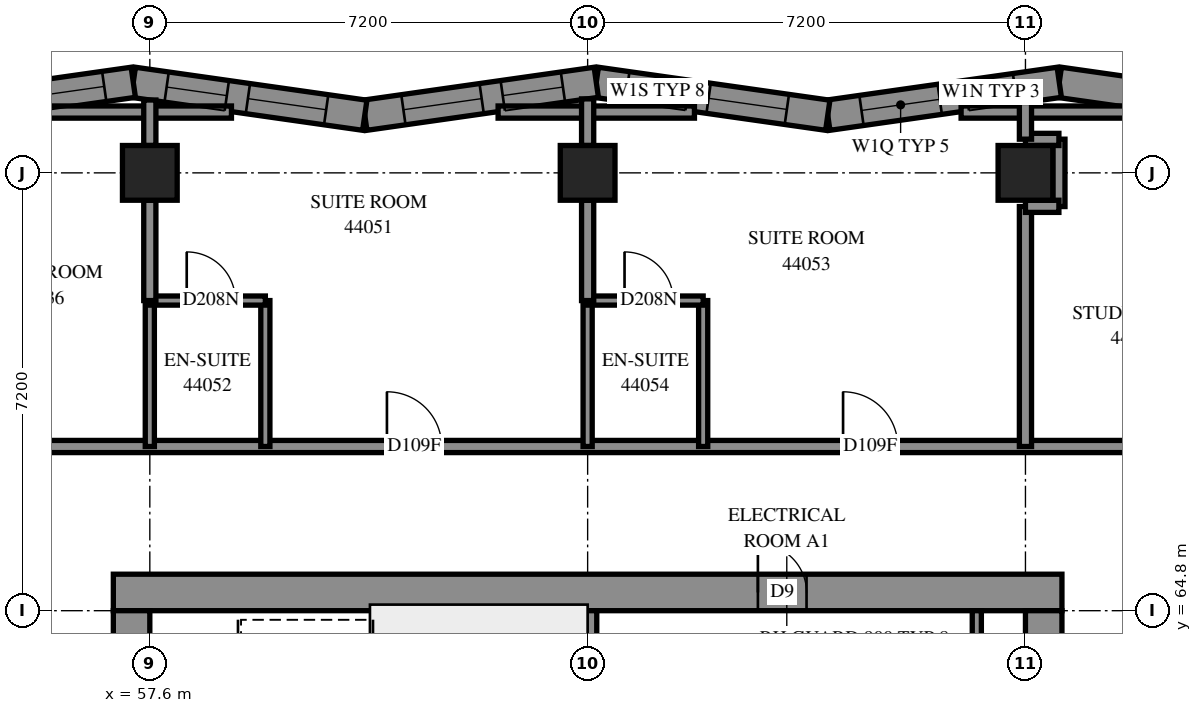
"""IFC4 building model, lengths in metres.
Left out: names, types, materials, properties, quantities, classifications, styles, units other than length and angle.
Written with IfcOpenShell. Run it as: python <this file> out.ifc"""

import sys

from ifc_helpers import new_model, si_unit, direction, frame, frame_2d, origin, origin_2d, place, context, subcontext, project, spatial, polyline, rectangle, outline, extrude, element, fill, save


model = new_model("IFC4")
c1 = context("Model", 3, precision=1e-05, world=origin(), true_north=direction((0.0, 1.0)))
c2 = subcontext(c1, "Body", "Model", "MODEL_VIEW")
j1 = project(units=[si_unit("LENGTHUNIT", "METRE"), si_unit("PLANEANGLEUNIT", "RADIAN")], contexts=[c1])
p1 = place(None, origin())
s1 = spatial("IfcSite", under=j1, at=p1, CompositionType="ELEMENT")
p2 = place(p1, origin())
s2 = spatial("IfcBuilding", under=s1, at=p2, CompositionType="ELEMENT")
p3 = place(p2, frame((0.0, 0.0, 162.6)))
s3 = spatial("IfcBuildingStorey", under=s2, at=p3, CompositionType="ELEMENT", Elevation=162.6)
for number, where, z_axis, x_axis in (
    (1, (57.6, 72.0, 0.0), (0.0, 0.0, 1.0), (1.0, 0.0, 0.0)),
    (2, (64.8, 72.0, 0.0), (0.0, 0.0, 1.0), (1.0, 0.0, 0.0)),
    (3, (72.0, 72.0, 0.0), (0.0, 0.0, 1.0), (1.0, 0.0, 0.0)),
):
    element("IfcColumn", number, at=place(p3, frame(where, z_axis=z_axis, x_axis=x_axis)), inside=s3, PredefinedType="COLUMN", context=c2, shape_type="SweptSolid", body=[
        extrude(rectangle(XDim=0.9, YDim=0.9, at=origin_2d()), origin(), (0.0, 0.0, 1.0), 3.1),
    ])
p4 = place(p3, frame((57.0, 65.1, -0.3), z_axis=(0.0, 0.0, 1.0), x_axis=(1.0, 0.0, 0.0)))
e4 = element("IfcWall", 4, at=p4, inside=s3, PredefinedType="SHEAR", context=c2, shape_type="SweptSolid", body=[
    extrude(rectangle(XDim=15.6, YDim=0.6, at=frame_2d((7.8, 0.0))), origin(), (0.0, 0.0, 1.0), 2.7),
])
p5 = place(p4, frame((10.6, 0.0, 0.3)))
e5 = element("IfcOpeningElement", 5, at=p5, cuts=e4, PredefinedType="OPENING", context=c2, shape_type="SweptSolid", body=[
    extrude(rectangle(XDim=0.8, YDim=2.1, at=frame_2d((0.4, 1.05))), frame((0.0, 0.31, 0.0), z_axis=(0.0, -1.0, 0.0), x_axis=(1.0, 0.0, 0.0)), (0.0, 0.0, 1.0), 0.62),
])
p6 = place(p3, frame((57.3, 50.4, -0.3), z_axis=(0.0, 0.0, 1.0), x_axis=(0.0, 1.0, 0.0)))
e6 = element("IfcWall", 6, at=p6, inside=s3, PredefinedType="SHEAR", context=c2, shape_type="SweptSolid", body=[
    extrude(rectangle(XDim=14.4, YDim=0.6, at=frame_2d((7.2, 0.0))), origin(), (0.0, 0.0, 1.0), 2.7),
])
p7 = place(p6, frame((4.55, 0.0, 0.3)))
e7 = element("IfcOpeningElement", 7, at=p7, cuts=e6, PredefinedType="OPENING", context=c2, shape_type="SweptSolid", body=[
    extrude(rectangle(XDim=1.1, YDim=2.1, at=frame_2d((0.55, 1.05))), frame((0.0, 0.31, 0.0), z_axis=(0.0, -1.0, 0.0), x_axis=(1.0, 0.0, 0.0)), (0.0, 0.0, 1.0), 0.62),
])
p8 = place(p6, frame((11.35, 0.0, 0.3)))
e8 = element("IfcOpeningElement", 8, at=p8, cuts=e6, PredefinedType="OPENING", context=c2, shape_type="SweptSolid", body=[
    extrude(rectangle(XDim=1.1, YDim=2.1, at=frame_2d((0.55, 1.05))), frame((0.0, 0.31, 0.0), z_axis=(0.0, -1.0, 0.0), x_axis=(1.0, 0.0, 0.0)), (0.0, 0.0, 1.0), 0.62),
])
p9 = place(p3, frame((72.3, 50.4, -0.3), z_axis=(0.0, 0.0, 1.0), x_axis=(0.0, 1.0, 0.0)))
e9 = element("IfcWall", 9, at=p9, inside=s3, PredefinedType="SHEAR", context=c2, shape_type="SweptSolid", body=[
    extrude(rectangle(XDim=14.4, YDim=0.6, at=frame_2d((7.2, 0.0))), origin(), (0.0, 0.0, 1.0), 2.7),
])
p10 = place(p9, frame((4.55, 0.0, 0.3)))
e10 = element("IfcOpeningElement", 10, at=p10, cuts=e9, PredefinedType="OPENING", context=c2, shape_type="SweptSolid", body=[
    extrude(rectangle(XDim=1.1, YDim=2.1, at=frame_2d((0.55, 1.05))), frame((0.0, 0.31, 0.0), z_axis=(0.0, -1.0, 0.0), x_axis=(1.0, 0.0, 0.0)), (0.0, 0.0, 1.0), 0.62),
])
p11 = place(p9, frame((11.35, 0.0, 0.3)))
e11 = element("IfcOpeningElement", 11, at=p11, cuts=e9, PredefinedType="OPENING", context=c2, shape_type="SweptSolid", body=[
    extrude(rectangle(XDim=1.1, YDim=2.1, at=frame_2d((0.55, 1.05))), frame((0.0, 0.31, 0.0), z_axis=(0.0, -1.0, 0.0), x_axis=(1.0, 0.0, 0.0)), (0.0, 0.0, 1.0), 0.62),
])
p12 = place(p3, frame((64.8, 60.6, 0.0), z_axis=(0.0, 0.0, 1.0), x_axis=(0.0, 1.0, 0.0)))
e12 = element("IfcWall", 12, at=p12, inside=s3, PredefinedType="SOLIDWALL", context=c2, shape_type="SweptSolid", body=[
    extrude(rectangle(XDim=4.2, YDim=0.3, at=frame_2d((2.1, 0.0))), origin(), (0.0, 0.0, 1.0), 3.1),
])
p13 = place(p3, frame((76.382, 72.945, 0.0), z_axis=(0.0, 0.0, 1.0), x_axis=(-0.9900145925, 0.140964913, 0.0)))
e13 = element("IfcWall", 13, at=p13, inside=s3, PredefinedType="SOLIDWALL", context=c2, shape_type="SweptSolid", body=[
    extrude(outline(polyline([(0.055, -0.25), (3.9, -0.25), (3.829, 0.25), (-0.055, 0.25), (0.055, -0.25)])), origin(), (0.0, 0.0, 1.0), 3.1),
])
p14 = place(p13, frame((0.86, 0.0, 0.45)))
e14 = element("IfcOpeningElement", 14, at=p14, cuts=e13, PredefinedType="OPENING", context=c2, shape_type="SweptSolid", body=[
    extrude(rectangle(XDim=1.2, YDim=2.5, at=frame_2d((0.6, 1.25))), frame((0.0, 0.26, 0.0), z_axis=(0.0, -1.0, 0.0), x_axis=(1.0, 0.0, 0.0)), (0.0, 0.0, 1.0), 0.52),
])
p15 = place(p3, frame((72.556, 73.49, 0.0), z_axis=(0.0, 0.0, 1.0), x_axis=(-0.990016994, -0.1409480459, 0.0)))
e15 = element("IfcWall", 15, at=p15, inside=s3, PredefinedType="SOLIDWALL", context=c2, shape_type="SweptSolid", body=[
    extrude(outline(polyline([(-0.036, -0.25), (3.81, -0.25), (3.881, 0.25), (0.036, 0.25), (-0.036, -0.25)])), origin(), (0.0, 0.0, 1.0), 3.1),
])
p16 = place(p15, frame((0.735, 0.0, 0.45)))
e16 = element("IfcOpeningElement", 16, at=p16, cuts=e15, PredefinedType="OPENING", context=c2, shape_type="SweptSolid", body=[
    extrude(rectangle(XDim=0.8, YDim=2.5, at=frame_2d((0.4, 1.25))), frame((0.0, 0.26, 0.0), z_axis=(0.0, -1.0, 0.0), x_axis=(1.0, 0.0, 0.0)), (0.0, 0.0, 1.0), 0.52),
])
p17 = place(p15, frame((1.985, 0.0, 0.45)))
e17 = element("IfcOpeningElement", 17, at=p17, cuts=e15, PredefinedType="OPENING", context=c2, shape_type="SweptSolid", body=[
    extrude(rectangle(XDim=1.3, YDim=2.5, at=frame_2d((0.65, 1.25))), frame((0.0, 0.26, 0.0), z_axis=(0.0, -1.0, 0.0), x_axis=(1.0, 0.0, 0.0)), (0.0, 0.0, 1.0), 0.52),
])
p18 = place(p3, frame((68.749, 72.948, 0.0), z_axis=(0.0, 0.0, 1.0), x_axis=(-0.990016994, 0.1409480459, 0.0)))
e18 = element("IfcWall", 18, at=p18, inside=s3, PredefinedType="SOLIDWALL", context=c2, shape_type="SweptSolid", body=[
    extrude(outline(polyline([(0.036, -0.25), (3.881, -0.25), (3.81, 0.25), (-0.036, 0.25), (0.036, -0.25)])), origin(), (0.0, 0.0, 1.0), 3.1),
])
p19 = place(p18, frame((0.68, 0.0, 0.45)))
e19 = element("IfcOpeningElement", 19, at=p19, cuts=e18, PredefinedType="OPENING", context=c2, shape_type="SweptSolid", body=[
    extrude(rectangle(XDim=1.3, YDim=2.5, at=frame_2d((0.65, 1.25))), frame((0.0, 0.26, 0.0), z_axis=(0.0, -1.0, 0.0), x_axis=(1.0, 0.0, 0.0)), (0.0, 0.0, 1.0), 0.52),
])
p20 = place(p18, frame((2.33, 0.0, 0.45)))
e20 = element("IfcOpeningElement", 20, at=p20, cuts=e18, PredefinedType="OPENING", context=c2, shape_type="SweptSolid", body=[
    extrude(rectangle(XDim=1.0, YDim=2.5, at=frame_2d((0.5, 1.25))), frame((0.0, 0.26, 0.0), z_axis=(0.0, -1.0, 0.0), x_axis=(1.0, 0.0, 0.0)), (0.0, 0.0, 1.0), 0.52),
])
p21 = place(p3, frame((64.942, 73.49, 0.0), z_axis=(0.0, 0.0, 1.0), x_axis=(-0.990016994, -0.1409480459, 0.0)))
e21 = element("IfcWall", 21, at=p21, inside=s3, PredefinedType="SOLIDWALL", context=c2, shape_type="SweptSolid", body=[
    extrude(outline(polyline([(-0.036, -0.25), (3.81, -0.25), (3.881, 0.25), (0.036, 0.25), (-0.036, -0.25)])), origin(), (0.0, 0.0, 1.0), 3.1),
])
p22 = place(p21, frame((0.554, 0.0, 0.45)))
e22 = element("IfcOpeningElement", 22, at=p22, cuts=e21, PredefinedType="OPENING", context=c2, shape_type="SweptSolid", body=[
    extrude(rectangle(XDim=1.0, YDim=2.5, at=frame_2d((0.5, 1.25))), frame((0.0, 0.26, 0.0), z_axis=(0.0, -1.0, 0.0), x_axis=(1.0, 0.0, 0.0)), (0.0, 0.0, 1.0), 0.52),
])
p23 = place(p21, frame((1.904, 0.0, 0.45)))
e23 = element("IfcOpeningElement", 23, at=p23, cuts=e21, PredefinedType="OPENING", context=c2, shape_type="SweptSolid", body=[
    extrude(rectangle(XDim=1.3, YDim=2.5, at=frame_2d((0.65, 1.25))), frame((0.0, 0.26, 0.0), z_axis=(0.0, -1.0, 0.0), x_axis=(1.0, 0.0, 0.0)), (0.0, 0.0, 1.0), 0.52),
])
p24 = place(p3, frame((61.135, 72.948, 0.0), z_axis=(0.0, 0.0, 1.0), x_axis=(-0.990016994, 0.1409480459, 0.0)))
e24 = element("IfcWall", 24, at=p24, inside=s3, PredefinedType="SOLIDWALL", context=c2, shape_type="SweptSolid", body=[
    extrude(outline(polyline([(0.036, -0.25), (3.881, -0.25), (3.81, 0.25), (-0.036, 0.25), (0.036, -0.25)])), origin(), (0.0, 0.0, 1.0), 3.1),
])
p25 = place(p24, frame((0.641, 0.0, 0.45)))
e25 = element("IfcOpeningElement", 25, at=p25, cuts=e24, PredefinedType="OPENING", context=c2, shape_type="SweptSolid", body=[
    extrude(rectangle(XDim=1.3, YDim=2.5, at=frame_2d((0.65, 1.25))), frame((0.0, 0.26, 0.0), z_axis=(0.0, -1.0, 0.0), x_axis=(1.0, 0.0, 0.0)), (0.0, 0.0, 1.0), 0.52),
])
p26 = place(p24, frame((2.292, 0.0, 0.45)))
e26 = element("IfcOpeningElement", 26, at=p26, cuts=e24, PredefinedType="OPENING", context=c2, shape_type="SweptSolid", body=[
    extrude(rectangle(XDim=1.0, YDim=2.5, at=frame_2d((0.5, 1.25))), frame((0.0, 0.26, 0.0), z_axis=(0.0, -1.0, 0.0), x_axis=(1.0, 0.0, 0.0)), (0.0, 0.0, 1.0), 0.52),
])
p27 = place(p3, frame((57.328, 73.49, 0.0), z_axis=(0.0, 0.0, 1.0), x_axis=(-0.990016994, -0.1409480459, 0.0)))
e27 = element("IfcWall", 27, at=p27, inside=s3, PredefinedType="SOLIDWALL", context=c2, shape_type="SweptSolid", body=[
    extrude(outline(polyline([(-0.036, -0.25), (3.81, -0.25), (3.881, 0.25), (0.036, 0.25), (-0.036, -0.25)])), origin(), (0.0, 0.0, 1.0), 3.1),
])
p28 = place(p27, frame((0.483, 0.0, 0.45)))
e28 = element("IfcOpeningElement", 28, at=p28, cuts=e27, PredefinedType="OPENING", context=c2, shape_type="SweptSolid", body=[
    extrude(rectangle(XDim=1.0, YDim=2.5, at=frame_2d((0.5, 1.25))), frame((0.0, 0.26, 0.0), z_axis=(0.0, -1.0, 0.0), x_axis=(1.0, 0.0, 0.0)), (0.0, 0.0, 1.0), 0.52),
])
p29 = place(p27, frame((1.833, 0.0, 0.45)))
e29 = element("IfcOpeningElement", 29, at=p29, cuts=e27, PredefinedType="OPENING", context=c2, shape_type="SweptSolid", body=[
    extrude(rectangle(XDim=1.3, YDim=2.5, at=frame_2d((0.65, 1.25))), frame((0.0, 0.26, 0.0), z_axis=(0.0, -1.0, 0.0), x_axis=(1.0, 0.0, 0.0)), (0.0, 0.0, 1.0), 0.52),
])
p30 = place(p3, frame((71.2, 63.78, 0.0), z_axis=(0.0, 0.0, 1.0), x_axis=(0.0, 1.0, 0.0)))
e30 = element("IfcWall", 30, at=p30, inside=s3, PredefinedType="PARTITIONING", context=c2, shape_type="SweptSolid", body=[
    extrude(rectangle(XDim=1.02, YDim=0.15, at=frame_2d((0.51, 0.0))), origin(), (0.0, 0.0, 1.0), 3.1),
])
p31 = place(p3, frame((54.9, 67.5, 0.0), z_axis=(0.0, 0.0, 1.0), x_axis=(1.0, 0.0, 0.0)))
e31 = element("IfcWall", 31, at=p31, inside=s3, PredefinedType="PARTITIONING", context=c2, shape_type="SweptSolid", body=[
    extrude(rectangle(XDim=19.8, YDim=0.2, at=frame_2d((9.9, 0.0))), origin(), (0.0, 0.0, 1.0), 3.1),
])
p32 = place(p31, frame((6.599, 0.0, 0.0)))
e32 = element("IfcOpeningElement", 32, at=p32, cuts=e31, PredefinedType="OPENING", context=c2, shape_type="SweptSolid", body=[
    extrude(rectangle(XDim=0.9, YDim=2.1, at=frame_2d((0.45, 1.05))), frame((0.0, 0.11, 0.0), z_axis=(0.0, -1.0, 0.0), x_axis=(1.0, 0.0, 0.0)), (0.0, 0.0, 1.0), 0.22),
])
p33 = place(p31, frame((14.101, 0.0, 0.0)))
e33 = element("IfcOpeningElement", 33, at=p33, cuts=e31, PredefinedType="OPENING", context=c2, shape_type="SweptSolid", body=[
    extrude(rectangle(XDim=0.9, YDim=2.1, at=frame_2d((0.45, 1.05))), frame((0.0, 0.11, 0.0), z_axis=(0.0, -1.0, 0.0), x_axis=(1.0, 0.0, 0.0)), (0.0, 0.0, 1.0), 0.22),
])
p34 = place(p3, frame((72.0, 67.5, 0.0), z_axis=(0.0, 0.0, 1.0), x_axis=(0.0, 1.0, 0.0)))
e34 = element("IfcWall", 34, at=p34, inside=s3, PredefinedType="PARTITIONING", context=c2, shape_type="SweptSolid", body=[
    extrude(rectangle(XDim=3.946, YDim=0.2, at=frame_2d((1.973, 0.0))), origin(), (0.0, 0.0, 1.0), 3.1),
])
for number, where, z_axis, x_axis in (
    (35, (55.714, 73.0, 0.0), (0.0, 0.0, 1.0), (1.0, 0.0, 0.0)),
    (36, (63.328, 73.0, 0.0), (0.0, 0.0, 1.0), (1.0, 0.0, 0.0)),
    (37, (70.942, 73.0, 0.0), (0.0, 0.0, 1.0), (1.0, 0.0, 0.0)),
):
    element("IfcWall", number, at=place(p3, frame(where, z_axis=z_axis, x_axis=x_axis)), inside=s3, PredefinedType="PARTITIONING", context=c2, shape_type="SweptSolid", body=[
        extrude(rectangle(XDim=3.229, YDim=0.2, at=frame_2d((1.614, 0.0))), origin(), (0.0, 0.0, 1.0), 3.1),
    ])
for number, where, z_axis, x_axis in (
    (38, (59.5, 67.5, 0.0), (0.0, 0.0, 1.0), (0.0, 1.0, 0.0)),
    (39, (57.6, 67.5, 0.0), (0.0, 0.0, 1.0), (0.0, 1.0, 0.0)),
    (40, (66.7, 67.5, 0.0), (0.0, 0.0, 1.0), (0.0, 1.0, 0.0)),
    (41, (64.8, 67.5, 0.0), (0.0, 0.0, 1.0), (0.0, 1.0, 0.0)),
):
    element("IfcWall", number, at=place(p3, frame(where, z_axis=z_axis, x_axis=x_axis)), inside=s3, PredefinedType="PARTITIONING", context=c2, shape_type="SweptSolid", body=[
        extrude(rectangle(XDim=2.4, YDim=0.15, at=frame_2d((1.2, 0.0))), origin(), (0.0, 0.0, 1.0), 3.1),
    ])
p35 = place(p3, frame((64.8, 69.9, 0.0), z_axis=(0.0, 0.0, 1.0), x_axis=(1.0, 0.0, 0.0)))
e42 = element("IfcWall", 42, at=p35, inside=s3, PredefinedType="PARTITIONING", context=c2, shape_type="SweptSolid", body=[
    extrude(rectangle(XDim=1.9, YDim=0.15, at=frame_2d((0.95, 0.0))), origin(), (0.0, 0.0, 1.0), 3.1),
])
p36 = place(p35, frame((0.607, 0.0, 0.0)))
e43 = element("IfcOpeningElement", 43, at=p36, cuts=e42, PredefinedType="OPENING", context=c2, shape_type="SweptSolid", body=[
    extrude(rectangle(XDim=0.8, YDim=2.1, at=frame_2d((0.4, 1.05))), frame((0.0, 0.085, 0.0), z_axis=(0.0, -1.0, 0.0), x_axis=(1.0, 0.0, 0.0)), (0.0, 0.0, 1.0), 0.17),
])
p37 = place(p3, frame((57.6, 69.9, 0.0), z_axis=(0.0, 0.0, 1.0), x_axis=(1.0, 0.0, 0.0)))
e44 = element("IfcWall", 44, at=p37, inside=s3, PredefinedType="PARTITIONING", context=c2, shape_type="SweptSolid", body=[
    extrude(rectangle(XDim=1.9, YDim=0.15, at=frame_2d((0.95, 0.0))), origin(), (0.0, 0.0, 1.0), 3.1),
])
p38 = place(p37, frame((0.607, 0.0, 0.0)))
e45 = element("IfcOpeningElement", 45, at=p38, cuts=e44, PredefinedType="OPENING", context=c2, shape_type="SweptSolid", body=[
    extrude(rectangle(XDim=0.8, YDim=2.1, at=frame_2d((0.4, 1.05))), frame((0.0, 0.085, 0.0), z_axis=(0.0, -1.0, 0.0), x_axis=(1.0, 0.0, 0.0)), (0.0, 0.0, 1.0), 0.17),
])
for number, where, z_axis, x_axis in (
    (46, (57.6, 69.9, 0.0), (0.0, 0.0, 1.0), (0.0, 1.0, 0.0)),
    (47, (64.8, 69.9, 0.0), (0.0, 0.0, 1.0), (0.0, 1.0, 0.0)),
):
    element("IfcWall", number, at=place(p3, frame(where, z_axis=z_axis, x_axis=x_axis)), inside=s3, PredefinedType="PARTITIONING", context=c2, shape_type="SweptSolid", body=[
        extrude(rectangle(XDim=1.65, YDim=0.2, at=frame_2d((0.825, 0.0))), origin(), (0.0, 0.0, 1.0), 3.1),
    ])
p39 = place(p3, frame((72.55, 71.446, 0.0), z_axis=(0.0, 0.0, 1.0), x_axis=(0.0, 1.0, 0.0)))
e48 = element("IfcWall", 48, at=p39, inside=s3, PredefinedType="PARTITIONING", context=c2, shape_type="SweptSolid", body=[
    extrude(rectangle(XDim=1.108, YDim=0.2, at=frame_2d((0.554, 0.0))), origin(), (0.0, 0.0, 1.0), 3.1),
])
p40 = place(p3, frame((57.6, 72.45, 0.0), z_axis=(0.0, 0.0, 1.0), x_axis=(0.0, 1.0, 0.0)))
e49 = element("IfcWall", 49, at=p40, inside=s3, PredefinedType="PARTITIONING", context=c2, shape_type="SweptSolid", body=[
    extrude(rectangle(XDim=0.748, YDim=0.2, at=frame_2d((0.374, 0.0))), origin(), (0.0, 0.0, 1.0), 3.1),
])
p41 = place(p3, frame((64.8, 72.45, 0.0), z_axis=(0.0, 0.0, 1.0), x_axis=(0.0, 1.0, 0.0)))
e50 = element("IfcWall", 50, at=p41, inside=s3, PredefinedType="PARTITIONING", context=c2, shape_type="SweptSolid", body=[
    extrude(rectangle(XDim=0.767, YDim=0.2, at=frame_2d((0.383, 0.0))), origin(), (0.0, 0.0, 1.0), 3.1),
])
for number, where, z_axis, x_axis in (
    (51, (72.0, 71.45, 0.0), (0.0, 0.0, 1.0), (1.0, 0.0, 0.0)),
    (52, (72.0, 72.55, 0.0), (0.0, 0.0, 1.0), (1.0, 0.0, 0.0)),
):
    element("IfcWall", number, at=place(p3, frame(where, z_axis=z_axis, x_axis=x_axis)), inside=s3, PredefinedType="PARTITIONING", context=c2, shape_type="SweptSolid", body=[
        extrude(rectangle(XDim=0.55, YDim=0.2, at=frame_2d((0.275, 0.0))), origin(), (0.0, 0.0, 1.0), 3.1),
    ])
p42 = place(p3, frame((72.0, 72.554, 0.0), z_axis=(0.0, 0.0, 1.0), x_axis=(0.0, 1.0, 0.0)))
e53 = element("IfcWall", 53, at=p42, inside=s3, PredefinedType="PARTITIONING", context=c2, shape_type="SweptSolid", body=[
    extrude(rectangle(XDim=0.604, YDim=0.2, at=frame_2d((0.302, 0.0))), origin(), (0.0, 0.0, 1.0), 3.1),
])
p43 = place(p5, origin())
e54 = element("IfcDoor", 54, at=p43, inside=s3, OperationType="SINGLE_SWING_RIGHT", PredefinedType="DOOR", context=c2, shape_type="SweptSolid", body=[
    extrude(rectangle(XDim=0.8, YDim=2.1, at=frame_2d((0.4, 1.05))), frame((0.0, 0.025, 0.0), z_axis=(0.0, -1.0, 0.0), x_axis=(1.0, 0.0, 0.0)), (0.0, 0.0, 1.0), 0.05),
])
fill(e5, e54)
p44 = place(p32, origin())
e55 = element("IfcDoor", 55, at=p44, inside=s3, OperationType="SINGLE_SWING_RIGHT", PredefinedType="DOOR", context=c2, shape_type="SweptSolid", body=[
    extrude(rectangle(XDim=0.9, YDim=2.1, at=frame_2d((0.45, 1.05))), frame((0.0, 0.025, 0.0), z_axis=(0.0, -1.0, 0.0), x_axis=(1.0, 0.0, 0.0)), (0.0, 0.0, 1.0), 0.05),
])
fill(e32, e55)
p45 = place(p38, origin())
e56 = element("IfcDoor", 56, at=p45, inside=s3, OperationType="SINGLE_SWING_RIGHT", PredefinedType="DOOR", context=c2, shape_type="SweptSolid", body=[
    extrude(rectangle(XDim=0.8, YDim=2.1, at=frame_2d((0.4, 1.05))), frame((0.0, 0.025, 0.0), z_axis=(0.0, -1.0, 0.0), x_axis=(1.0, 0.0, 0.0)), (0.0, 0.0, 1.0), 0.05),
])
fill(e45, e56)
p46 = place(p33, origin())
e57 = element("IfcDoor", 57, at=p46, inside=s3, OperationType="SINGLE_SWING_RIGHT", PredefinedType="DOOR", context=c2, shape_type="SweptSolid", body=[
    extrude(rectangle(XDim=0.9, YDim=2.1, at=frame_2d((0.45, 1.05))), frame((0.0, 0.025, 0.0), z_axis=(0.0, -1.0, 0.0), x_axis=(1.0, 0.0, 0.0)), (0.0, 0.0, 1.0), 0.05),
])
fill(e33, e57)
p47 = place(p36, origin())
e58 = element("IfcDoor", 58, at=p47, inside=s3, OperationType="SINGLE_SWING_RIGHT", PredefinedType="DOOR", context=c2, shape_type="SweptSolid", body=[
    extrude(rectangle(XDim=0.8, YDim=2.1, at=frame_2d((0.4, 1.05))), frame((0.0, 0.025, 0.0), z_axis=(0.0, -1.0, 0.0), x_axis=(1.0, 0.0, 0.0)), (0.0, 0.0, 1.0), 0.05),
])
fill(e43, e58)
p48 = place(p16, origin())
e59 = element("IfcWindow", 59, at=p48, inside=s3, PartitioningType="SINGLE_PANEL", PredefinedType="WINDOW", context=c2, shape_type="SweptSolid", body=[
    extrude(rectangle(XDim=0.8, YDim=2.5, at=frame_2d((0.4, 1.25))), frame((0.0, 0.14, 0.0), z_axis=(0.0, -1.0, 0.0), x_axis=(1.0, 0.0, 0.0)), (0.0, 0.0, 1.0), 0.06),
])
fill(e16, e59)
p49 = place(p17, origin())
e60 = element("IfcWindow", 60, at=p49, inside=s3, PartitioningType="SINGLE_PANEL", PredefinedType="WINDOW", context=c2, shape_type="SweptSolid", body=[
    extrude(rectangle(XDim=1.3, YDim=2.5, at=frame_2d((0.65, 1.25))), frame((0.0, 0.18, 0.0), z_axis=(0.0, -1.0, 0.0), x_axis=(1.0, 0.0, 0.0)), (0.0, 0.0, 1.0), 0.06),
])
fill(e17, e60)
p50 = place(p19, origin())
e61 = element("IfcWindow", 61, at=p50, inside=s3, PartitioningType="SINGLE_PANEL", PredefinedType="WINDOW", context=c2, shape_type="SweptSolid", body=[
    extrude(rectangle(XDim=1.3, YDim=2.5, at=frame_2d((0.65, 1.25))), frame((0.0, 0.18, 0.0), z_axis=(0.0, -1.0, 0.0), x_axis=(1.0, 0.0, 0.0)), (0.0, 0.0, 1.0), 0.06),
])
fill(e19, e61)
p51 = place(p20, origin())
e62 = element("IfcWindow", 62, at=p51, inside=s3, PartitioningType="SINGLE_PANEL", PredefinedType="WINDOW", context=c2, shape_type="SweptSolid", body=[
    extrude(rectangle(XDim=1.0, YDim=2.5, at=frame_2d((0.5, 1.25))), frame((0.0, 0.14, 0.0), z_axis=(0.0, -1.0, 0.0), x_axis=(1.0, 0.0, 0.0)), (0.0, 0.0, 1.0), 0.06),
])
fill(e20, e62)
p52 = place(p22, origin())
e63 = element("IfcWindow", 63, at=p52, inside=s3, PartitioningType="SINGLE_PANEL", PredefinedType="WINDOW", context=c2, shape_type="SweptSolid", body=[
    extrude(rectangle(XDim=1.0, YDim=2.5, at=frame_2d((0.5, 1.25))), frame((0.0, 0.14, 0.0), z_axis=(0.0, -1.0, 0.0), x_axis=(1.0, 0.0, 0.0)), (0.0, 0.0, 1.0), 0.06),
])
fill(e22, e63)
p53 = place(p23, origin())
e64 = element("IfcWindow", 64, at=p53, inside=s3, PartitioningType="SINGLE_PANEL", PredefinedType="WINDOW", context=c2, shape_type="SweptSolid", body=[
    extrude(rectangle(XDim=1.3, YDim=2.5, at=frame_2d((0.65, 1.25))), frame((0.0, 0.18, 0.0), z_axis=(0.0, -1.0, 0.0), x_axis=(1.0, 0.0, 0.0)), (0.0, 0.0, 1.0), 0.06),
])
fill(e23, e64)
p54 = place(p25, origin())
e65 = element("IfcWindow", 65, at=p54, inside=s3, PartitioningType="SINGLE_PANEL", PredefinedType="WINDOW", context=c2, shape_type="SweptSolid", body=[
    extrude(rectangle(XDim=1.3, YDim=2.5, at=frame_2d((0.65, 1.25))), frame((0.0, 0.18, 0.0), z_axis=(0.0, -1.0, 0.0), x_axis=(1.0, 0.0, 0.0)), (0.0, 0.0, 1.0), 0.06),
])
fill(e25, e65)
p55 = place(p26, origin())
e66 = element("IfcWindow", 66, at=p55, inside=s3, PartitioningType="SINGLE_PANEL", PredefinedType="WINDOW", context=c2, shape_type="SweptSolid", body=[
    extrude(rectangle(XDim=1.0, YDim=2.5, at=frame_2d((0.5, 1.25))), frame((0.0, 0.14, 0.0), z_axis=(0.0, -1.0, 0.0), x_axis=(1.0, 0.0, 0.0)), (0.0, 0.0, 1.0), 0.06),
])
fill(e26, e66)
p56 = place(p28, origin())
e67 = element("IfcWindow", 67, at=p56, inside=s3, PartitioningType="SINGLE_PANEL", PredefinedType="WINDOW", context=c2, shape_type="SweptSolid", body=[
    extrude(rectangle(XDim=1.0, YDim=2.5, at=frame_2d((0.5, 1.25))), frame((0.0, 0.15, 0.0), z_axis=(0.0, -1.0, 0.0), x_axis=(1.0, 0.0, 0.0)), (0.0, 0.0, 1.0), 0.06),
])
fill(e28, e67)
save(model, sys.argv[1])
